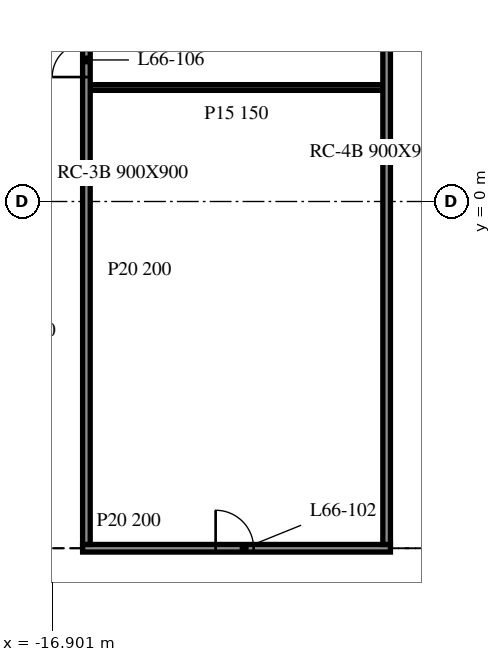
"""IFC4 building model, lengths in metres.
Left out: names, types, materials, properties, quantities, classifications, styles, units other than length and angle.
Written with IfcOpenShell. Run it as: python <this file> out.ifc"""

import sys

from ifc_helpers import new_model, si_unit, direction, frame, frame_2d, origin, place, context, subcontext, project, spatial, rectangle, extrude, element, fill, save


model = new_model("IFC4")
c1 = context("Model", 3, precision=1e-05, world=origin(), true_north=direction((0.0, 1.0)))
c2 = subcontext(c1, "Body", "Model", "MODEL_VIEW")
j1 = project(units=[si_unit("LENGTHUNIT", "METRE"), si_unit("PLANEANGLEUNIT", "RADIAN")], contexts=[c1])
p1 = place(None, origin())
s1 = spatial("IfcSite", under=j1, at=p1, CompositionType="ELEMENT")
p2 = place(p1, origin())
s2 = spatial("IfcBuilding", under=s1, at=p2, CompositionType="ELEMENT")
p3 = place(p2, frame((0.0, 0.0, 270.9)))
s3 = spatial("IfcBuildingStorey", under=s2, at=p3, CompositionType="ELEMENT", Elevation=270.9)
p4 = place(p3, frame((-16.1, -9.125, 0.0), z_axis=(0.0, 0.0, 1.0), x_axis=(1.0, 0.0, 0.0)))
e1 = element("IfcWall", 1, at=p4, inside=s3, PredefinedType="PARTITIONING", context=c2, shape_type="SweptSolid", body=[
    extrude(rectangle(XDim=8.1, YDim=0.2, at=frame_2d((4.05, 0.0))), origin(), (0.0, 0.0, 1.0), 3.46),
])
p5 = place(p4, frame((3.5, 0.0, 0.0)))
e2 = element("IfcOpeningElement", 2, at=p5, cuts=e1, PredefinedType="OPENING", context=c2, shape_type="SweptSolid", body=[
    extrude(rectangle(XDim=1.0, YDim=2.1, at=frame_2d((0.5, 1.05))), frame((0.0, 0.11, 0.0), z_axis=(0.0, -1.0, 0.0), x_axis=(1.0, 0.0, 0.0)), (0.0, 0.0, 1.0), 0.22),
])
p6 = place(p3, frame((-15.9, 3.0, 0.0), z_axis=(0.0, 0.0, 1.0), x_axis=(1.0, 0.0, 0.0)))
e3 = element("IfcWall", 3, at=p6, inside=s3, PredefinedType="PARTITIONING", context=c2, shape_type="SweptSolid", body=[
    extrude(rectangle(XDim=7.7, YDim=0.15, at=frame_2d((3.85, 0.0))), origin(), (0.0, 0.0, 1.0), 3.46),
])
p7 = place(p3, frame((-16.0, -9.025, 0.0), z_axis=(0.0, 0.0, 1.0), x_axis=(0.0, 1.0, 0.0)))
e4 = element("IfcWall", 4, at=p7, inside=s3, PredefinedType="PARTITIONING", context=c2, shape_type="SweptSolid", body=[
    extrude(rectangle(XDim=24.05, YDim=0.2, at=frame_2d((12.025, 0.0))), origin(), (0.0, 0.0, 1.0), 3.46),
])
p8 = place(p7, frame((12.3, 0.0, 0.0)))
e5 = element("IfcOpeningElement", 5, at=p8, cuts=e4, PredefinedType="OPENING", context=c2, shape_type="SweptSolid", body=[
    extrude(rectangle(XDim=0.9, YDim=2.1, at=frame_2d((0.45, 1.05))), frame((0.0, 0.11, 0.0), z_axis=(0.0, -1.0, 0.0), x_axis=(1.0, 0.0, 0.0)), (0.0, 0.0, 1.0), 0.22),
])
p9 = place(p3, frame((-8.1, -9.025, 0.0), z_axis=(0.0, 0.0, 1.0), x_axis=(0.0, 1.0, 0.0)))
e6 = element("IfcWall", 6, at=p9, inside=s3, PredefinedType="PARTITIONING", context=c2, shape_type="SweptSolid", body=[
    extrude(rectangle(XDim=24.05, YDim=0.2, at=frame_2d((12.025, 0.0))), origin(), (0.0, 0.0, 1.0), 3.46),
])
p10 = place(p5, origin())
e7 = element("IfcDoor", 7, at=p10, inside=s3, OperationType="SINGLE_SWING_LEFT", PredefinedType="DOOR", context=c2, shape_type="SweptSolid", body=[
    extrude(rectangle(XDim=1.0, YDim=2.1, at=frame_2d((0.5, 1.05))), frame((0.0, 0.025, 0.0), z_axis=(0.0, -1.0, 0.0), x_axis=(1.0, 0.0, 0.0)), (0.0, 0.0, 1.0), 0.05),
])
fill(e2, e7)
p11 = place(p8, origin())
e8 = element("IfcDoor", 8, at=p11, inside=s3, OperationType="SINGLE_SWING_LEFT", PredefinedType="DOOR", context=c2, shape_type="SweptSolid", body=[
    extrude(rectangle(XDim=0.9, YDim=2.1, at=frame_2d((0.45, 1.05))), frame((0.0, 0.025, 0.0), z_axis=(0.0, -1.0, 0.0), x_axis=(1.0, 0.0, 0.0)), (0.0, 0.0, 1.0), 0.05),
])
fill(e5, e8)
save(model, sys.argv[1])
